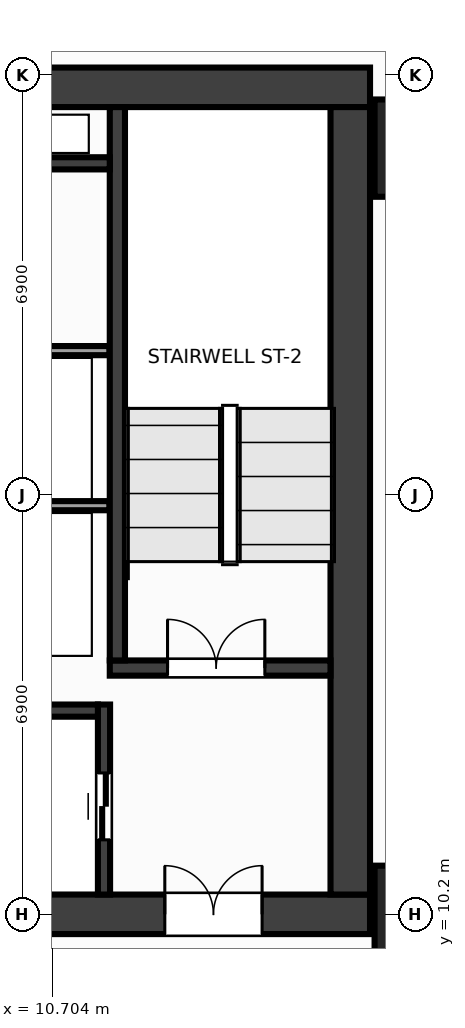
"""IFC4 building model, lengths in metres.
Left out: names, types, materials, properties, quantities, classifications, styles, units other than length and angle.
Written with IfcOpenShell. Run it as: python <this file> out.ifc"""

import sys

from ifc_helpers import new_model, si_unit, direction, frame, frame_2d, origin, origin_2d, place, context, subcontext, project, spatial, rectangle, extrude, source, transform, mapped, element, fill, save


model = new_model("IFC4")
c1 = context("Model", 3, precision=1e-05, world=origin(), true_north=direction((0.0, 1.0)))
c2 = subcontext(c1, "Body", "Model", "MODEL_VIEW")
j1 = project(units=[si_unit("LENGTHUNIT", "METRE"), si_unit("PLANEANGLEUNIT", "RADIAN")], contexts=[c1])
p1 = place(None, origin())
s1 = spatial("IfcSite", under=j1, at=p1, CompositionType="ELEMENT")
p2 = place(p1, origin())
s2 = spatial("IfcBuilding", under=s1, at=p2, CompositionType="ELEMENT")
p3 = place(p2, frame((0.0, 0.0, 117.2)))
s3 = spatial("IfcBuildingStorey", under=s2, at=p3, CompositionType="ELEMENT", Elevation=117.2)
m1 = source(origin(), c2, "Body", "SweptSolid", [
    extrude(rectangle(XDim=31.85, YDim=0.65, at=frame_2d((15.925, 0.0))), origin(), (0.0, 0.0, 1.0), 3.6),
])
p4 = place(p3, frame((-15.925, 23.8, 0.0), z_axis=(0.0, 0.0, 1.0), x_axis=(1.0, 0.0, 0.0)))
e1 = element("IfcWall", 1, at=p4, inside=s3, PredefinedType="SHEAR", context=c2, shape_type="MappedRepresentation", body=[
    mapped(m1, transform((0.0, 0.0, 0.0), x_axis=(1.0, 0.0, 0.0), y_axis=(0.0, 1.0, 0.0), z_axis=(0.0, 0.0, 1.0), scale=1.0)),
])
p5 = place(p3, frame((-15.925, 10.2, 0.0), z_axis=(0.0, 0.0, 1.0), x_axis=(1.0, 0.0, 0.0)))
e2 = element("IfcWall", 2, at=p5, inside=s3, PredefinedType="SHEAR", context=c2, shape_type="MappedRepresentation", body=[
    mapped(m1, transform((0.0, 0.0, 0.0), x_axis=(1.0, 0.0, 0.0), y_axis=(0.0, 1.0, 0.0), z_axis=(0.0, 0.0, 1.0), scale=1.0)),
])
p6 = place(p5, frame((1.775, 0.0, 0.0)))
e3 = element("IfcOpeningElement", 3, at=p6, cuts=e2, PredefinedType="OPENING", context=c2, shape_type="SweptSolid", body=[
    extrude(rectangle(XDim=1.6, YDim=2.15, at=frame_2d((0.8, 1.075))), frame((0.0, 0.337, 0.0), z_axis=(0.0, -1.0, 0.0), x_axis=(1.0, 0.0, 0.0)), (0.0, 0.0, 1.0), 0.674),
])
p7 = place(p5, frame((28.475, 0.0, 0.0)))
e4 = element("IfcOpeningElement", 4, at=p7, cuts=e2, PredefinedType="OPENING", context=c2, shape_type="SweptSolid", body=[
    extrude(rectangle(XDim=1.6, YDim=2.15, at=frame_2d((0.8, 1.075))), frame((0.0, 0.337, 0.0), z_axis=(0.0, -1.0, 0.0), x_axis=(1.0, 0.0, 0.0)), (0.0, 0.0, 1.0), 0.674),
])
p8 = place(p5, frame((15.175, 0.0, 0.0)))
e5 = element("IfcOpeningElement", 5, at=p8, cuts=e2, PredefinedType="OPENING", context=c2, shape_type="SweptSolid", body=[
    extrude(rectangle(XDim=1.5, YDim=2.2, at=frame_2d((0.75, 1.1))), frame((0.0, 0.337, 0.0), z_axis=(0.0, -1.0, 0.0), x_axis=(1.0, 0.0, 0.0)), (0.0, 0.0, 1.0), 0.674),
])
m2 = source(origin(), c2, "Body", "SweptSolid", [
    extrude(rectangle(XDim=12.95, YDim=0.65, at=frame_2d((6.475, 0.0))), origin(), (0.0, 0.0, 1.0), 3.6),
])
p9 = place(p3, frame((15.6, 10.525, 0.0), z_axis=(0.0, 0.0, 1.0), x_axis=(0.0, 1.0, 0.0)))
e6 = element("IfcWall", 6, at=p9, inside=s3, PredefinedType="SHEAR", context=c2, shape_type="MappedRepresentation", body=[
    mapped(m2, transform((0.0, 0.0, 0.0), x_axis=(1.0, 0.0, 0.0), y_axis=(0.0, 1.0, 0.0), z_axis=(0.0, 0.0, 1.0), scale=1.0)),
])
m3 = source(origin(), c2, "Body", "SweptSolid", [
    extrude(rectangle(XDim=3.63, YDim=0.25, at=frame_2d((1.815, 0.0))), origin(), (0.0, 0.0, 1.0), 3.6),
])
p10 = place(p3, frame((11.645, 14.25, 0.0), z_axis=(0.0, 0.0, 1.0), x_axis=(1.0, 0.0, 0.0)))
e7 = element("IfcWall", 7, at=p10, inside=s3, PredefinedType="SHEAR", context=c2, shape_type="MappedRepresentation", body=[
    mapped(m3, transform((0.0, 0.0, 0.0), x_axis=(1.0, 0.0, 0.0), y_axis=(0.0, 1.0, 0.0), z_axis=(0.0, 0.0, 1.0), scale=1.0)),
])
p11 = place(p10, frame((0.95, 0.0, 0.0)))
e8 = element("IfcOpeningElement", 8, at=p11, cuts=e7, PredefinedType="OPENING", context=c2, shape_type="SweptSolid", body=[
    extrude(rectangle(XDim=1.6, YDim=2.15, at=frame_2d((0.8, 1.075))), frame((0.0, 0.137, 0.0), z_axis=(0.0, -1.0, 0.0), x_axis=(1.0, 0.0, 0.0)), (0.0, 0.0, 1.0), 0.274),
])
m4 = source(origin(), c2, "Body", "SweptSolid", [
    extrude(rectangle(XDim=9.1, YDim=0.25, at=frame_2d((4.55, 0.0))), origin(), (0.0, 0.0, 1.0), 3.6),
])
p12 = place(p3, frame((11.77, 14.375, 0.0), z_axis=(0.0, 0.0, 1.0), x_axis=(0.0, 1.0, 0.0)))
e9 = element("IfcWall", 9, at=p12, inside=s3, PredefinedType="SHEAR", context=c2, shape_type="MappedRepresentation", body=[
    mapped(m4, transform((0.0, 0.0, 0.0), x_axis=(1.0, 0.0, 0.0), y_axis=(0.0, 1.0, 0.0), z_axis=(0.0, 0.0, 1.0), scale=1.0)),
])
m5 = source(origin(), c2, "Body", "SweptSolid", [
    extrude(rectangle(XDim=3.125, YDim=0.2, at=frame_2d((1.562, 0.0))), origin(), (0.0, 0.0, 1.0), 3.6),
])
p13 = place(p3, frame((11.55, 10.525, 0.0), z_axis=(0.0, 0.0, 1.0), x_axis=(0.0, 1.0, 0.0)))
e10 = element("IfcWall", 10, at=p13, inside=s3, PredefinedType="SHEAR", context=c2, shape_type="MappedRepresentation", body=[
    mapped(m5, transform((0.0, 0.0, 0.0), x_axis=(1.0, 0.0, 0.0), y_axis=(0.0, 1.0, 0.0), z_axis=(0.0, 0.0, 1.0), scale=1.0)),
])
p14 = place(p13, frame((0.9, 0.0, 0.0)))
e11 = element("IfcOpeningElement", 11, at=p14, cuts=e10, PredefinedType="OPENING", context=c2, shape_type="SweptSolid", body=[
    extrude(rectangle(XDim=1.1, YDim=2.15, at=frame_2d((0.55, 1.075))), frame((0.0, 0.112, 0.0), z_axis=(0.0, -1.0, 0.0), x_axis=(1.0, 0.0, 0.0)), (0.0, 0.0, 1.0), 0.224),
])
m6 = source(origin(), c2, "Body", "SweptSolid", [
    extrude(rectangle(XDim=2.825, YDim=0.2, at=frame_2d((1.413, 0.0))), origin(), (0.0, 0.0, 1.0), 3.6),
])
p15 = place(p3, frame((8.625, 13.55, 0.0), z_axis=(0.0, 0.0, 1.0), x_axis=(1.0, 0.0, 0.0)))
e12 = element("IfcWall", 12, at=p15, inside=s3, PredefinedType="SHEAR", context=c2, shape_type="MappedRepresentation", body=[
    mapped(m6, transform((0.0, 0.0, 0.0), x_axis=(1.0, 0.0, 0.0), y_axis=(0.0, 1.0, 0.0), z_axis=(0.0, 0.0, 1.0), scale=1.0)),
])
m7 = source(origin(), c2, "Body", "SweptSolid", [
    extrude(rectangle(XDim=3.02, YDim=0.2, at=frame_2d((1.51, 0.0))), origin(), (0.0, 0.0, 1.0), 3.6),
])
p16 = place(p3, frame((8.625, 22.55, 0.0), z_axis=(0.0, 0.0, 1.0), x_axis=(1.0, 0.0, 0.0)))
e13 = element("IfcWall", 13, at=p16, inside=s3, PredefinedType="SHEAR", context=c2, shape_type="MappedRepresentation", body=[
    mapped(m7, transform((0.0, 0.0, 0.0), x_axis=(1.0, 0.0, 0.0), y_axis=(0.0, 1.0, 0.0), z_axis=(0.0, 0.0, 1.0), scale=1.0)),
])
m8 = source(origin(), c2, "Body", "SweptSolid", [
    extrude(rectangle(XDim=1.6, YDim=1.6, at=origin_2d()), origin(), (0.0, 0.0, 1.0), 3.6),
])
for number, where, z_axis, x_axis in (
    (14, (16.8, 10.2, 0.0), (0.0, 0.0, 1.0), (1.0, 0.0, 0.0)),
    (15, (16.8, 22.8, 0.0), (0.0, 0.0, 1.0), (1.0, 0.0, 0.0)),
):
    element("IfcColumn", number, at=place(p3, frame(where, z_axis=z_axis, x_axis=x_axis)), inside=s3, PredefinedType="COLUMN", context=c2, shape_type="MappedRepresentation", body=[
        mapped(m8, transform((0.0, 0.0, 0.0), x_axis=(1.0, 0.0, 0.0), y_axis=(0.0, 1.0, 0.0), z_axis=(0.0, 0.0, 1.0), scale=1.0)),
    ])
m9 = source(origin(), c2, "Body", "SweptSolid", [
    extrude(rectangle(XDim=3.01, YDim=0.15, at=frame_2d((1.505, 0.0))), origin(), (0.0, 0.0, 1.0), 3.36),
])
for number, where, z_axis, x_axis in (
    (16, (8.63, 16.92, 0.0), (0.0, 0.0, 1.0), (1.0, 0.0, 0.0)),
    (17, (8.63, 19.47, 0.0), (0.0, 0.0, 1.0), (1.0, 0.0, 0.0)),
):
    element("IfcWall", number, at=place(p3, frame(where, z_axis=z_axis, x_axis=x_axis)), inside=s3, PredefinedType="PARTITIONING", context=c2, shape_type="MappedRepresentation", body=[
        mapped(m9, transform((0.0, 0.0, 0.0), x_axis=(1.0, 0.0, 0.0), y_axis=(0.0, 1.0, 0.0), z_axis=(0.0, 0.0, 1.0), scale=1.0)),
    ])
m10 = source(origin(), c2, "Body", "SweptSolid", [
    extrude(rectangle(XDim=1.6, YDim=2.15, at=frame_2d((0.8, 1.075))), frame((0.0, 0.025, 0.0), z_axis=(0.0, -1.0, 0.0), x_axis=(1.0, 0.0, 0.0)), (0.0, 0.0, 1.0), 0.05),
])
p17 = place(p11, origin())
e18 = element("IfcDoor", 18, at=p17, inside=s3, OperationType="DOUBLE_DOOR_SINGLE_SWING", PredefinedType="DOOR", context=c2, shape_type="MappedRepresentation", body=[
    mapped(m10, transform((0.0, 0.0, 0.0), x_axis=(1.0, 0.0, 0.0), y_axis=(0.0, 1.0, 0.0), z_axis=(0.0, 0.0, 1.0), scale=1.0)),
])
fill(e8, e18)
p18 = place(p7, origin())
e19 = element("IfcDoor", 19, at=p18, inside=s3, OperationType="DOUBLE_DOOR_SINGLE_SWING", PredefinedType="DOOR", context=c2, shape_type="MappedRepresentation", body=[
    mapped(m10, transform((0.0, 0.0, 0.0), x_axis=(1.0, 0.0, 0.0), y_axis=(0.0, 1.0, 0.0), z_axis=(0.0, 0.0, 1.0), scale=1.0)),
])
fill(e4, e19)
m11 = source(origin(), c2, "Body", "SweptSolid", [
    extrude(rectangle(XDim=1.1, YDim=2.15, at=frame_2d((0.55, 1.075))), frame((0.0, 0.025, 0.0), z_axis=(0.0, -1.0, 0.0), x_axis=(1.0, 0.0, 0.0)), (0.0, 0.0, 1.0), 0.05),
])
p19 = place(p14, origin())
e20 = element("IfcDoor", 20, at=p19, inside=s3, OperationType="DOUBLE_DOOR_SLIDING", PredefinedType="DOOR", context=c2, shape_type="MappedRepresentation", body=[
    mapped(m11, transform((0.0, 0.0, 0.0), x_axis=(1.0, 0.0, 0.0), y_axis=(0.0, 1.0, 0.0), z_axis=(0.0, 0.0, 1.0), scale=1.0)),
])
fill(e11, e20)
save(model, sys.argv[1])
